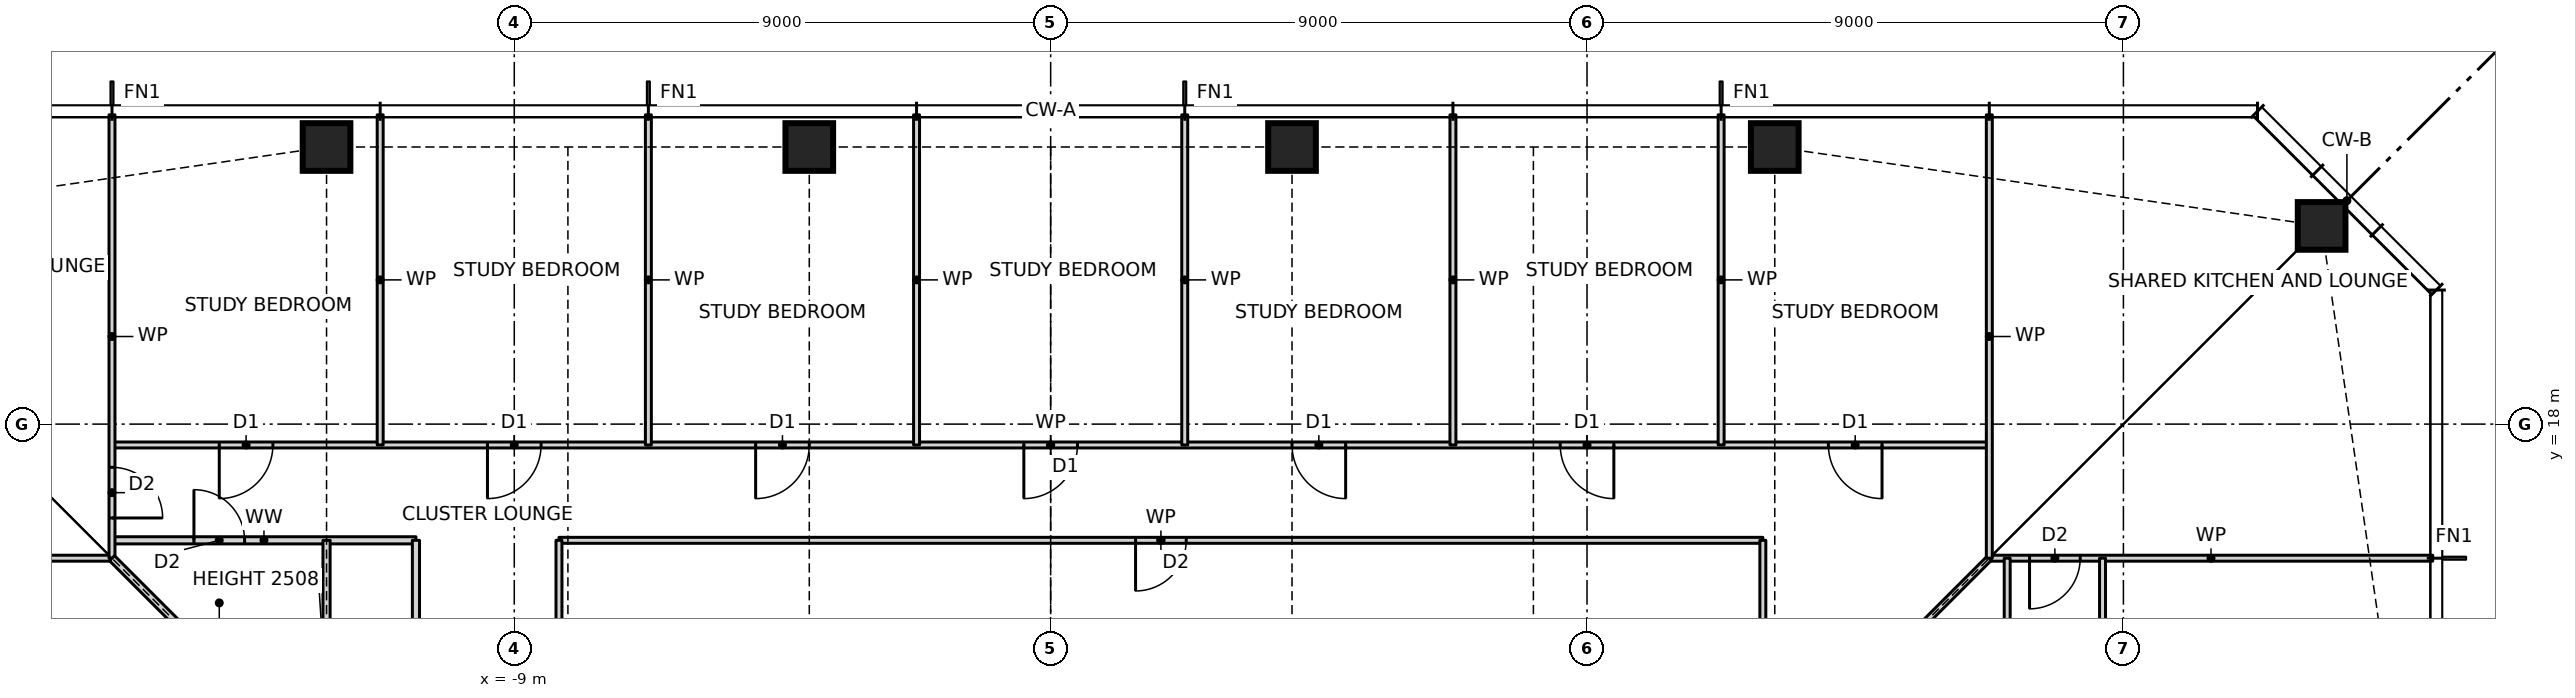
"""IFC4 building model, lengths in metres.
Left out: names, types, materials, properties, quantities, classifications, styles, units other than length and angle.
Written with IfcOpenShell. Run it as: python <this file> out.ifc"""

import sys

from ifc_helpers import new_model, si_unit, direction, frame, frame_2d, origin, origin_2d, place, context, subcontext, project, spatial, rectangle, hollow_rectangle, extrude, element, fill, save


model = new_model("IFC4")
c1 = context("Model", 3, precision=1e-05, world=origin(), true_north=direction((0.0, 1.0)))
c2 = subcontext(c1, "Body", "Model", "MODEL_VIEW")
j1 = project(units=[si_unit("LENGTHUNIT", "METRE"), si_unit("PLANEANGLEUNIT", "RADIAN")], contexts=[c1])
p1 = place(None, origin())
s1 = spatial("IfcSite", under=j1, at=p1, CompositionType="ELEMENT")
p2 = place(p1, origin())
s2 = spatial("IfcBuilding", under=s1, at=p2, CompositionType="ELEMENT")
p3 = place(p2, frame((0.0, 0.0, 22.0)))
s3 = spatial("IfcBuildingStorey", under=s2, at=p3, CompositionType="ELEMENT", Elevation=22.0)
for number, where, z_axis, x_axis in (
    (1, (21.326, 21.326, 0.0), (0.0, 0.0, 1.0), (1.0, 0.0, 0.0)),
    (2, (12.15, 22.65, 0.0), (0.0, 0.0, 1.0), (1.0, 0.0, 0.0)),
    (3, (4.05, 22.65, 0.0), (0.0, 0.0, 1.0), (1.0, 0.0, 0.0)),
    (4, (-4.05, 22.65, 0.0), (0.0, 0.0, 1.0), (1.0, 0.0, 0.0)),
    (5, (-12.15, 22.65, 0.0), (0.0, 0.0, 1.0), (1.0, 0.0, 0.0)),
):
    element("IfcColumn", number, at=place(p3, frame(where, z_axis=z_axis, x_axis=x_axis)), inside=s3, PredefinedType="COLUMN", context=c2, shape_type="SweptSolid", body=[
        extrude(hollow_rectangle(XDim=0.8, YDim=0.8, WallThickness=0.09, at=origin_2d()), origin(), (0.0, 0.0, 1.0), 3.5),
    ])
p4 = place(p3, frame((-23.19, 15.75, 0.0), z_axis=(0.0, 0.0, 1.0), x_axis=(1.0, 0.0, 0.0)))
e6 = element("IfcWall", 6, at=p4, inside=s3, PredefinedType="PARTITIONING", context=c2, shape_type="SweptSolid", body=[
    extrude(rectangle(XDim=7.44, YDim=0.1, at=frame_2d((3.72, 0.0))), origin(), (0.0, 0.0, 1.0), 3.27),
])
p5 = place(p3, frame((15.75, 15.75, 0.0), z_axis=(0.0, 0.0, 1.0), x_axis=(1.0, 0.0, 0.0)))
e7 = element("IfcWall", 7, at=p5, inside=s3, PredefinedType="PARTITIONING", context=c2, shape_type="SweptSolid", body=[
    extrude(rectangle(XDim=7.44, YDim=0.1, at=frame_2d((3.72, 0.0))), origin(), (0.0, 0.0, 1.0), 3.27),
])
p6 = place(p5, frame((0.675, 0.0, 0.0)))
e8 = element("IfcOpeningElement", 8, at=p6, cuts=e7, PredefinedType="OPENING", context=c2, shape_type="SweptSolid", body=[
    extrude(rectangle(XDim=0.85, YDim=2.1, at=frame_2d((0.425, 1.05))), frame((0.0, 0.06, 0.0), z_axis=(0.0, -1.0, 0.0), x_axis=(1.0, 0.0, 0.0)), (0.0, 0.0, 1.0), 0.12),
])
p7 = place(p3, frame((-15.75, 16.05, 0.0), z_axis=(0.0, 0.0, 1.0), x_axis=(1.0, 0.0, 0.0)))
e9 = element("IfcWall", 9, at=p7, inside=s3, PredefinedType="PARTITIONING", context=c2, shape_type="SweptSolid", body=[
    extrude(rectangle(XDim=5.1, YDim=0.12, at=frame_2d((2.55, 0.0))), origin(), (0.0, 0.0, 1.0), 3.27),
])
p8 = place(p7, frame((1.375, 0.0, 0.0)))
e10 = element("IfcOpeningElement", 10, at=p8, cuts=e9, PredefinedType="OPENING", context=c2, shape_type="SweptSolid", body=[
    extrude(rectangle(XDim=0.85, YDim=2.1, at=frame_2d((0.425, 1.05))), frame((0.0, 0.07, 0.0), z_axis=(0.0, -1.0, 0.0), x_axis=(1.0, 0.0, 0.0)), (0.0, 0.0, 1.0), 0.14),
])
p9 = place(p3, frame((-8.25, 16.05, 0.0), z_axis=(0.0, 0.0, 1.0), x_axis=(1.0, 0.0, 0.0)))
e11 = element("IfcWall", 11, at=p9, inside=s3, PredefinedType="PARTITIONING", context=c2, shape_type="SweptSolid", body=[
    extrude(rectangle(XDim=20.2, YDim=0.1, at=frame_2d((10.1, 0.0))), origin(), (0.0, 0.0, 1.0), 3.27),
])
p10 = place(p9, frame((9.675, 0.0, 0.0)))
e12 = element("IfcOpeningElement", 12, at=p10, cuts=e11, PredefinedType="OPENING", context=c2, shape_type="SweptSolid", body=[
    extrude(rectangle(XDim=0.85, YDim=2.1, at=frame_2d((0.425, 1.05))), frame((0.0, 0.06, 0.0), z_axis=(0.0, -1.0, 0.0), x_axis=(1.0, 0.0, 0.0)), (0.0, 0.0, 1.0), 0.12),
])
p11 = place(p3, frame((-15.75, 17.65, 0.0), z_axis=(0.0, 0.0, 1.0), x_axis=(1.0, 0.0, 0.0)))
e13 = element("IfcWall", 13, at=p11, inside=s3, PredefinedType="PARTITIONING", context=c2, shape_type="SweptSolid", body=[
    extrude(rectangle(XDim=31.5, YDim=0.1, at=frame_2d((15.75, 0.0))), origin(), (0.0, 0.0, 1.0), 3.27),
])
p12 = place(p11, frame((28.8, 0.0, 0.0)))
e14 = element("IfcOpeningElement", 14, at=p12, cuts=e13, PredefinedType="OPENING", context=c2, shape_type="SweptSolid", body=[
    extrude(rectangle(XDim=0.9, YDim=2.1, at=frame_2d((0.45, 1.05))), frame((0.0, 0.06, 0.0), z_axis=(0.0, -1.0, 0.0), x_axis=(1.0, 0.0, 0.0)), (0.0, 0.0, 1.0), 0.12),
])
p13 = place(p11, frame((24.3, 0.0, 0.0)))
e15 = element("IfcOpeningElement", 15, at=p13, cuts=e13, PredefinedType="OPENING", context=c2, shape_type="SweptSolid", body=[
    extrude(rectangle(XDim=0.9, YDim=2.1, at=frame_2d((0.45, 1.05))), frame((0.0, 0.06, 0.0), z_axis=(0.0, -1.0, 0.0), x_axis=(1.0, 0.0, 0.0)), (0.0, 0.0, 1.0), 0.12),
])
p14 = place(p11, frame((19.8, 0.0, 0.0)))
e16 = element("IfcOpeningElement", 16, at=p14, cuts=e13, PredefinedType="OPENING", context=c2, shape_type="SweptSolid", body=[
    extrude(rectangle(XDim=0.9, YDim=2.1, at=frame_2d((0.45, 1.05))), frame((0.0, 0.06, 0.0), z_axis=(0.0, -1.0, 0.0), x_axis=(1.0, 0.0, 0.0)), (0.0, 0.0, 1.0), 0.12),
])
p15 = place(p11, frame((15.3, 0.0, 0.0)))
e17 = element("IfcOpeningElement", 17, at=p15, cuts=e13, PredefinedType="OPENING", context=c2, shape_type="SweptSolid", body=[
    extrude(rectangle(XDim=0.9, YDim=2.1, at=frame_2d((0.45, 1.05))), frame((0.0, 0.06, 0.0), z_axis=(0.0, -1.0, 0.0), x_axis=(1.0, 0.0, 0.0)), (0.0, 0.0, 1.0), 0.12),
])
p16 = place(p11, frame((10.8, 0.0, 0.0)))
e18 = element("IfcOpeningElement", 18, at=p16, cuts=e13, PredefinedType="OPENING", context=c2, shape_type="SweptSolid", body=[
    extrude(rectangle(XDim=0.9, YDim=2.1, at=frame_2d((0.45, 1.05))), frame((0.0, 0.06, 0.0), z_axis=(0.0, -1.0, 0.0), x_axis=(1.0, 0.0, 0.0)), (0.0, 0.0, 1.0), 0.12),
])
p17 = place(p11, frame((6.3, 0.0, 0.0)))
e19 = element("IfcOpeningElement", 19, at=p17, cuts=e13, PredefinedType="OPENING", context=c2, shape_type="SweptSolid", body=[
    extrude(rectangle(XDim=0.9, YDim=2.1, at=frame_2d((0.45, 1.05))), frame((0.0, 0.06, 0.0), z_axis=(0.0, -1.0, 0.0), x_axis=(1.0, 0.0, 0.0)), (0.0, 0.0, 1.0), 0.12),
])
p18 = place(p11, frame((1.8, 0.0, 0.0)))
e20 = element("IfcOpeningElement", 20, at=p18, cuts=e13, PredefinedType="OPENING", context=c2, shape_type="SweptSolid", body=[
    extrude(rectangle(XDim=0.9, YDim=2.1, at=frame_2d((0.45, 1.05))), frame((0.0, 0.06, 0.0), z_axis=(0.0, -1.0, 0.0), x_axis=(1.0, 0.0, 0.0)), (0.0, 0.0, 1.0), 0.12),
])
p19 = place(p3, frame((11.6, 11.6, 0.0), z_axis=(0.0, 0.0, 1.0), x_axis=(0.707106781187, 0.707106781187, 0.0)))
e21 = element("IfcWall", 21, at=p19, inside=s3, PredefinedType="PARTITIONING", context=c2, shape_type="SweptSolid", body=[
    extrude(rectangle(XDim=5.869, YDim=0.1, at=frame_2d((2.935, 0.0))), origin(), (0.0, 0.0, 1.0), 2.343),
])
p20 = place(p3, frame((17.65, -15.75, 0.0), z_axis=(0.0, 0.0, 1.0), x_axis=(0.0, 1.0, 0.0)))
e22 = element("IfcWall", 22, at=p20, inside=s3, PredefinedType="PARTITIONING", context=c2, shape_type="SweptSolid", body=[
    extrude(rectangle(XDim=31.5, YDim=0.1, at=frame_2d((15.75, 0.0))), origin(), (0.0, 0.0, 1.0), 3.27),
])
p21 = place(p20, frame((1.8, 0.0, 0.0)))
e23 = element("IfcOpeningElement", 23, at=p21, cuts=e22, PredefinedType="OPENING", context=c2, shape_type="SweptSolid", body=[
    extrude(rectangle(XDim=0.9, YDim=2.1, at=frame_2d((0.45, 1.05))), frame((0.0, 0.06, 0.0), z_axis=(0.0, -1.0, 0.0), x_axis=(1.0, 0.0, 0.0)), (0.0, 0.0, 1.0), 0.12),
])
p22 = place(p20, frame((6.3, 0.0, 0.0)))
e24 = element("IfcOpeningElement", 24, at=p22, cuts=e22, PredefinedType="OPENING", context=c2, shape_type="SweptSolid", body=[
    extrude(rectangle(XDim=0.9, YDim=2.1, at=frame_2d((0.45, 1.05))), frame((0.0, 0.06, 0.0), z_axis=(0.0, -1.0, 0.0), x_axis=(1.0, 0.0, 0.0)), (0.0, 0.0, 1.0), 0.12),
])
p23 = place(p20, frame((10.8, 0.0, 0.0)))
e25 = element("IfcOpeningElement", 25, at=p23, cuts=e22, PredefinedType="OPENING", context=c2, shape_type="SweptSolid", body=[
    extrude(rectangle(XDim=0.9, YDim=2.1, at=frame_2d((0.45, 1.05))), frame((0.0, 0.06, 0.0), z_axis=(0.0, -1.0, 0.0), x_axis=(1.0, 0.0, 0.0)), (0.0, 0.0, 1.0), 0.12),
])
p24 = place(p20, frame((15.3, 0.0, 0.0)))
e26 = element("IfcOpeningElement", 26, at=p24, cuts=e22, PredefinedType="OPENING", context=c2, shape_type="SweptSolid", body=[
    extrude(rectangle(XDim=0.9, YDim=2.1, at=frame_2d((0.45, 1.05))), frame((0.0, 0.06, 0.0), z_axis=(0.0, -1.0, 0.0), x_axis=(1.0, 0.0, 0.0)), (0.0, 0.0, 1.0), 0.12),
])
p25 = place(p20, frame((19.8, 0.0, 0.0)))
e27 = element("IfcOpeningElement", 27, at=p25, cuts=e22, PredefinedType="OPENING", context=c2, shape_type="SweptSolid", body=[
    extrude(rectangle(XDim=0.9, YDim=2.1, at=frame_2d((0.45, 1.05))), frame((0.0, 0.06, 0.0), z_axis=(0.0, -1.0, 0.0), x_axis=(1.0, 0.0, 0.0)), (0.0, 0.0, 1.0), 0.12),
])
p26 = place(p20, frame((24.3, 0.0, 0.0)))
e28 = element("IfcOpeningElement", 28, at=p26, cuts=e22, PredefinedType="OPENING", context=c2, shape_type="SweptSolid", body=[
    extrude(rectangle(XDim=0.9, YDim=2.1, at=frame_2d((0.45, 1.05))), frame((0.0, 0.06, 0.0), z_axis=(0.0, -1.0, 0.0), x_axis=(1.0, 0.0, 0.0)), (0.0, 0.0, 1.0), 0.12),
])
p27 = place(p20, frame((28.8, 0.0, 0.0)))
e29 = element("IfcOpeningElement", 29, at=p27, cuts=e22, PredefinedType="OPENING", context=c2, shape_type="SweptSolid", body=[
    extrude(rectangle(XDim=0.9, YDim=2.1, at=frame_2d((0.45, 1.05))), frame((0.0, 0.06, 0.0), z_axis=(0.0, -1.0, 0.0), x_axis=(1.0, 0.0, 0.0)), (0.0, 0.0, 1.0), 0.12),
])
p28 = place(p3, frame((16.05, -3.75, 0.0), z_axis=(0.0, 0.0, 1.0), x_axis=(0.0, 1.0, 0.0)))
e30 = element("IfcWall", 30, at=p28, inside=s3, PredefinedType="PARTITIONING", context=c2, shape_type="SweptSolid", body=[
    extrude(rectangle(XDim=19.5, YDim=0.1, at=frame_2d((9.75, 0.0))), origin(), (0.0, 0.0, 1.0), 3.27),
])
p29 = place(p28, frame((9.325, 0.0, 0.0)))
e31 = element("IfcOpeningElement", 31, at=p29, cuts=e30, PredefinedType="OPENING", context=c2, shape_type="SweptSolid", body=[
    extrude(rectangle(XDim=0.85, YDim=2.1, at=frame_2d((0.425, 1.05))), frame((0.0, 0.06, 0.0), z_axis=(0.0, -1.0, 0.0), x_axis=(1.0, 0.0, 0.0)), (0.0, 0.0, 1.0), 0.12),
])
p30 = place(p3, frame((15.75, 15.75, 0.0), z_axis=(0.0, 0.0, 1.0), x_axis=(0.0, 1.0, 0.0)))
e32 = element("IfcWall", 32, at=p30, inside=s3, PredefinedType="PARTITIONING", context=c2, shape_type="SweptSolid", body=[
    extrude(rectangle(XDim=7.44, YDim=0.1, at=frame_2d((3.72, 0.0))), origin(), (0.0, 0.0, 1.0), 3.27),
])
p31 = place(p3, frame((11.95, 11.95, 0.0), z_axis=(0.0, 0.0, 1.0), x_axis=(0.0, 1.0, 0.0)))
e33 = element("IfcWall", 33, at=p31, inside=s3, PredefinedType="PARTITIONING", context=c2, shape_type="SweptSolid", body=[
    extrude(rectangle(XDim=4.1, YDim=0.1, at=frame_2d((2.05, 0.0))), origin(), (0.0, 0.0, 1.0), 3.27),
])
for number, where, z_axis, x_axis in (
    (34, (11.25, 17.65, 0.0), (0.0, 0.0, 1.0), (0.0, 1.0, 0.0)),
    (35, (6.75, 17.65, 0.0), (0.0, 0.0, 1.0), (0.0, 1.0, 0.0)),
    (36, (2.25, 17.65, 0.0), (0.0, 0.0, 1.0), (0.0, 1.0, 0.0)),
    (37, (-2.25, 17.65, 0.0), (0.0, 0.0, 1.0), (0.0, 1.0, 0.0)),
    (38, (-6.75, 17.65, 0.0), (0.0, 0.0, 1.0), (0.0, 1.0, 0.0)),
):
    element("IfcWall", number, at=place(p3, frame(where, z_axis=z_axis, x_axis=x_axis)), inside=s3, PredefinedType="PARTITIONING", context=c2, shape_type="SweptSolid", body=[
        extrude(rectangle(XDim=5.54, YDim=0.1, at=frame_2d((2.77, 0.0))), origin(), (0.0, 0.0, 1.0), 3.27),
    ])
p32 = place(p3, frame((-8.25, 11.6, 0.0), z_axis=(0.0, 0.0, 1.0), x_axis=(0.0, 1.0, 0.0)))
e39 = element("IfcWall", 39, at=p32, inside=s3, PredefinedType="PARTITIONING", context=c2, shape_type="SweptSolid", body=[
    extrude(rectangle(XDim=4.45, YDim=0.1, at=frame_2d((2.225, 0.0))), origin(), (0.0, 0.0, 1.0), 3.27),
])
p33 = place(p3, frame((-10.65, 11.6, 0.0), z_axis=(0.0, 0.0, 1.0), x_axis=(0.0, 1.0, 0.0)))
e40 = element("IfcWall", 40, at=p33, inside=s3, PredefinedType="PARTITIONING", context=c2, shape_type="SweptSolid", body=[
    extrude(rectangle(XDim=4.45, YDim=0.12, at=frame_2d((2.225, 0.0))), origin(), (0.0, 0.0, 1.0), 3.27),
])
p34 = place(p33, frame((1.8, 0.0, 0.0)))
e41 = element("IfcOpeningElement", 41, at=p34, cuts=e40, PredefinedType="OPENING", context=c2, shape_type="SweptSolid", body=[
    extrude(rectangle(XDim=0.85, YDim=2.1, at=frame_2d((0.425, 1.05))), frame((0.0, 0.07, 0.0), z_axis=(0.0, -1.0, 0.0), x_axis=(1.0, 0.0, 0.0)), (0.0, 0.0, 1.0), 0.14),
])
p35 = place(p3, frame((-11.25, 17.65, 0.0), z_axis=(0.0, 0.0, 1.0), x_axis=(0.0, 1.0, 0.0)))
e42 = element("IfcWall", 42, at=p35, inside=s3, PredefinedType="PARTITIONING", context=c2, shape_type="SweptSolid", body=[
    extrude(rectangle(XDim=5.54, YDim=0.1, at=frame_2d((2.77, 0.0))), origin(), (0.0, 0.0, 1.0), 3.27),
])
p36 = place(p3, frame((-12.15, 12.15, 0.0), z_axis=(0.0, 0.0, 1.0), x_axis=(0.0, 1.0, 0.0)))
e43 = element("IfcWall", 43, at=p36, inside=s3, PredefinedType="PARTITIONING", context=c2, shape_type="SweptSolid", body=[
    extrude(rectangle(XDim=3.9, YDim=0.12, at=frame_2d((1.95, 0.0))), origin(), (0.0, 0.0, 1.0), 2.508),
])
p37 = place(p3, frame((-15.75, 15.75, 0.0), z_axis=(0.0, 0.0, 1.0), x_axis=(0.0, 1.0, 0.0)))
e44 = element("IfcWall", 44, at=p37, inside=s3, PredefinedType="PARTITIONING", context=c2, shape_type="SweptSolid", body=[
    extrude(rectangle(XDim=7.44, YDim=0.1, at=frame_2d((3.72, 0.0))), origin(), (0.0, 0.0, 1.0), 3.27),
])
p38 = place(p37, frame((0.675, 0.0, 0.0)))
e45 = element("IfcOpeningElement", 45, at=p38, cuts=e44, PredefinedType="OPENING", context=c2, shape_type="SweptSolid", body=[
    extrude(rectangle(XDim=0.85, YDim=2.1, at=frame_2d((0.425, 1.05))), frame((0.0, 0.06, 0.0), z_axis=(0.0, -1.0, 0.0), x_axis=(1.0, 0.0, 0.0)), (0.0, 0.0, 1.0), 0.12),
])
p39 = place(p3, frame((-11.6, 11.6, 0.0), z_axis=(0.0, 0.0, 1.0), x_axis=(-0.707106781187, 0.707106781187, 0.0)))
e46 = element("IfcWall", 46, at=p39, inside=s3, PredefinedType="PARTITIONING", context=c2, shape_type="SweptSolid", body=[
    extrude(rectangle(XDim=5.869, YDim=0.12, at=frame_2d((2.935, 0.0))), origin(), (0.0, 0.0, 1.0), 2.343),
])
p40 = place(p12, frame((0.9, 0.0, 0.0), z_axis=(0.0, 0.0, 1.0), x_axis=(-1.0, 0.0, 0.0)))
e47 = element("IfcDoor", 47, at=p40, inside=s3, OperationType="SINGLE_SWING_LEFT", PredefinedType="DOOR", context=c2, shape_type="SweptSolid", body=[
    extrude(rectangle(XDim=0.9, YDim=2.1, at=frame_2d((0.45, 1.05))), frame((0.0, 0.025, 0.0), z_axis=(0.0, -1.0, 0.0), x_axis=(1.0, 0.0, 0.0)), (0.0, 0.0, 1.0), 0.05),
])
fill(e14, e47)
p41 = place(p13, frame((0.9, 0.0, 0.0), z_axis=(0.0, 0.0, 1.0), x_axis=(-1.0, 0.0, 0.0)))
e48 = element("IfcDoor", 48, at=p41, inside=s3, OperationType="SINGLE_SWING_LEFT", PredefinedType="DOOR", context=c2, shape_type="SweptSolid", body=[
    extrude(rectangle(XDim=0.9, YDim=2.1, at=frame_2d((0.45, 1.05))), frame((0.0, 0.025, 0.0), z_axis=(0.0, -1.0, 0.0), x_axis=(1.0, 0.0, 0.0)), (0.0, 0.0, 1.0), 0.05),
])
fill(e15, e48)
p42 = place(p14, frame((0.9, 0.0, 0.0), z_axis=(0.0, 0.0, 1.0), x_axis=(-1.0, 0.0, 0.0)))
e49 = element("IfcDoor", 49, at=p42, inside=s3, OperationType="SINGLE_SWING_LEFT", PredefinedType="DOOR", context=c2, shape_type="SweptSolid", body=[
    extrude(rectangle(XDim=0.9, YDim=2.1, at=frame_2d((0.45, 1.05))), frame((0.0, 0.025, 0.0), z_axis=(0.0, -1.0, 0.0), x_axis=(1.0, 0.0, 0.0)), (0.0, 0.0, 1.0), 0.05),
])
fill(e16, e49)
p43 = place(p15, frame((0.9, 0.0, 0.0), z_axis=(0.0, 0.0, 1.0), x_axis=(-1.0, 0.0, 0.0)))
e50 = element("IfcDoor", 50, at=p43, inside=s3, OperationType="SINGLE_SWING_RIGHT", PredefinedType="DOOR", context=c2, shape_type="SweptSolid", body=[
    extrude(rectangle(XDim=0.9, YDim=2.1, at=frame_2d((0.45, 1.05))), frame((0.0, 0.025, 0.0), z_axis=(0.0, -1.0, 0.0), x_axis=(1.0, 0.0, 0.0)), (0.0, 0.0, 1.0), 0.05),
])
fill(e17, e50)
p44 = place(p16, frame((0.9, 0.0, 0.0), z_axis=(0.0, 0.0, 1.0), x_axis=(-1.0, 0.0, 0.0)))
e51 = element("IfcDoor", 51, at=p44, inside=s3, OperationType="SINGLE_SWING_RIGHT", PredefinedType="DOOR", context=c2, shape_type="SweptSolid", body=[
    extrude(rectangle(XDim=0.9, YDim=2.1, at=frame_2d((0.45, 1.05))), frame((0.0, 0.025, 0.0), z_axis=(0.0, -1.0, 0.0), x_axis=(1.0, 0.0, 0.0)), (0.0, 0.0, 1.0), 0.05),
])
fill(e18, e51)
p45 = place(p17, frame((0.9, 0.0, 0.0), z_axis=(0.0, 0.0, 1.0), x_axis=(-1.0, 0.0, 0.0)))
e52 = element("IfcDoor", 52, at=p45, inside=s3, OperationType="SINGLE_SWING_RIGHT", PredefinedType="DOOR", context=c2, shape_type="SweptSolid", body=[
    extrude(rectangle(XDim=0.9, YDim=2.1, at=frame_2d((0.45, 1.05))), frame((0.0, 0.025, 0.0), z_axis=(0.0, -1.0, 0.0), x_axis=(1.0, 0.0, 0.0)), (0.0, 0.0, 1.0), 0.05),
])
fill(e19, e52)
p46 = place(p18, frame((0.9, 0.0, 0.0), z_axis=(0.0, 0.0, 1.0), x_axis=(-1.0, 0.0, 0.0)))
e53 = element("IfcDoor", 53, at=p46, inside=s3, OperationType="SINGLE_SWING_RIGHT", PredefinedType="DOOR", context=c2, shape_type="SweptSolid", body=[
    extrude(rectangle(XDim=0.9, YDim=2.1, at=frame_2d((0.45, 1.05))), frame((0.0, 0.025, 0.0), z_axis=(0.0, -1.0, 0.0), x_axis=(1.0, 0.0, 0.0)), (0.0, 0.0, 1.0), 0.05),
])
fill(e20, e53)
p47 = place(p10, frame((0.85, 0.0, 0.0), z_axis=(0.0, 0.0, 1.0), x_axis=(-1.0, 0.0, 0.0)))
e54 = element("IfcDoor", 54, at=p47, inside=s3, OperationType="SINGLE_SWING_RIGHT", PredefinedType="DOOR", context=c2, shape_type="SweptSolid", body=[
    extrude(rectangle(XDim=0.85, YDim=2.1, at=frame_2d((0.425, 1.05))), frame((0.0, 0.025, 0.0), z_axis=(0.0, -1.0, 0.0), x_axis=(1.0, 0.0, 0.0)), (0.0, 0.0, 1.0), 0.05),
])
fill(e12, e54)
p48 = place(p8, origin())
e55 = element("IfcDoor", 55, at=p48, inside=s3, OperationType="SINGLE_SWING_LEFT", PredefinedType="DOOR", context=c2, shape_type="SweptSolid", body=[
    extrude(rectangle(XDim=0.85, YDim=2.1, at=frame_2d((0.425, 1.05))), frame((0.0, 0.025, 0.0), z_axis=(0.0, -1.0, 0.0), x_axis=(1.0, 0.0, 0.0)), (0.0, 0.0, 1.0), 0.05),
])
fill(e10, e55)
p49 = place(p6, frame((0.85, 0.0, 0.0), z_axis=(0.0, 0.0, 1.0), x_axis=(-1.0, 0.0, 0.0)))
e56 = element("IfcDoor", 56, at=p49, inside=s3, OperationType="SINGLE_SWING_RIGHT", PredefinedType="DOOR", context=c2, shape_type="SweptSolid", body=[
    extrude(rectangle(XDim=0.85, YDim=2.1, at=frame_2d((0.425, 1.05))), frame((0.0, 0.025, 0.0), z_axis=(0.0, -1.0, 0.0), x_axis=(1.0, 0.0, 0.0)), (0.0, 0.0, 1.0), 0.05),
])
fill(e8, e56)
p50 = place(p38, frame((0.85, 0.0, 0.0), z_axis=(0.0, 0.0, 1.0), x_axis=(-1.0, 0.0, 0.0)))
e57 = element("IfcDoor", 57, at=p50, inside=s3, OperationType="SINGLE_SWING_RIGHT", PredefinedType="DOOR", context=c2, shape_type="SweptSolid", body=[
    extrude(rectangle(XDim=0.85, YDim=2.1, at=frame_2d((0.425, 1.05))), frame((0.0, 0.025, 0.0), z_axis=(0.0, -1.0, 0.0), x_axis=(1.0, 0.0, 0.0)), (0.0, 0.0, 1.0), 0.05),
])
fill(e45, e57)
save(model, sys.argv[1])
